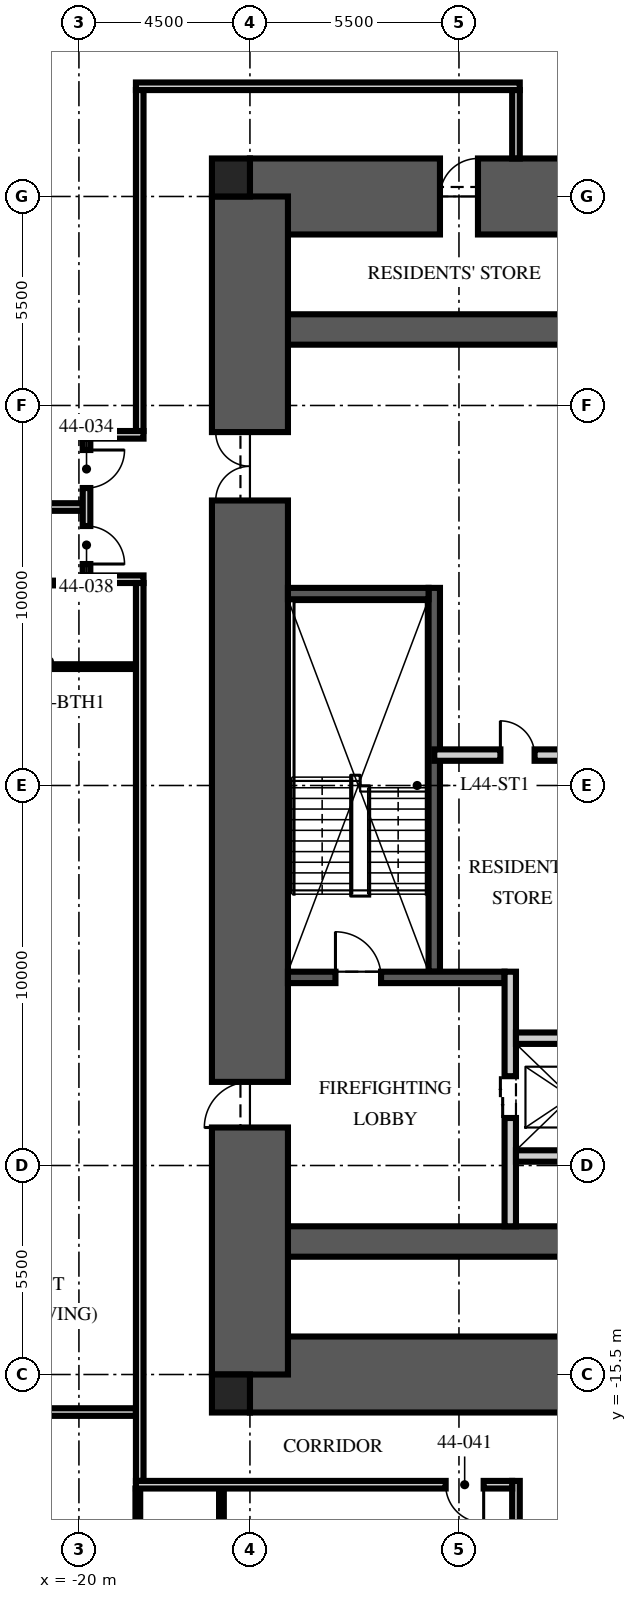
"""IFC4 building model, lengths in metres.
Left out: names, types, materials, properties, quantities, classifications, styles, units other than length and angle.
Written with IfcOpenShell. Run it as: python <this file> out.ifc"""

import sys

from ifc_helpers import new_model, si_unit, direction, frame, frame_2d, origin, origin_2d, place, context, subcontext, project, spatial, rectangle, extrude, element, fill, save


model = new_model("IFC4")
c1 = context("Model", 3, precision=1e-05, world=origin(), true_north=direction((0.0, 1.0)))
c2 = subcontext(c1, "Body", "Model", "MODEL_VIEW")
j1 = project(units=[si_unit("LENGTHUNIT", "METRE"), si_unit("PLANEANGLEUNIT", "RADIAN")], contexts=[c1])
p1 = place(None, origin())
s1 = spatial("IfcSite", under=j1, at=p1, CompositionType="ELEMENT")
p2 = place(p1, origin())
s2 = spatial("IfcBuilding", under=s1, at=p2, CompositionType="ELEMENT")
p3 = place(p2, frame((0.0, 0.0, 174.75)))
s3 = spatial("IfcBuildingStorey", under=s2, at=p3, CompositionType="ELEMENT", Elevation=174.75)
p4 = place(p3, frame((-15.5, 15.5, -0.25), z_axis=(0.0, 0.0, 1.0), x_axis=(1.0, 0.0, 0.0)))
e1 = element("IfcWall", 1, at=p4, inside=s3, PredefinedType="SHEAR", context=c2, shape_type="SweptSolid", body=[
    extrude(rectangle(XDim=31.0, YDim=2.0, at=frame_2d((15.5, 0.0))), origin(), (0.0, 0.0, 1.0), 3.75),
])
p5 = place(p4, frame((5.0, 0.0, 0.25)))
e2 = element("IfcOpeningElement", 2, at=p5, cuts=e1, PredefinedType="OPENING", context=c2, shape_type="SweptSolid", body=[
    extrude(rectangle(XDim=1.0, YDim=2.1, at=frame_2d((0.5, 1.05))), frame((0.0, 1.01, 0.0), z_axis=(0.0, -1.0, 0.0), x_axis=(1.0, 0.0, 0.0)), (0.0, 0.0, 1.0), 2.02),
])
p6 = place(p3, frame((-15.5, -15.5, -0.25), z_axis=(0.0, 0.0, 1.0), x_axis=(1.0, 0.0, 0.0)))
e3 = element("IfcWall", 3, at=p6, inside=s3, PredefinedType="SHEAR", context=c2, shape_type="SweptSolid", body=[
    extrude(rectangle(XDim=31.0, YDim=2.0, at=frame_2d((15.5, 0.0))), origin(), (0.0, 0.0, 1.0), 3.75),
])
p7 = place(p6, frame((10.4, 0.0, 0.25)))
e4 = element("IfcOpeningElement", 4, at=p7, cuts=e3, PredefinedType="OPENING", context=c2, shape_type="SweptSolid", body=[
    extrude(rectangle(XDim=1.1, YDim=2.1, at=frame_2d((0.55, 1.05))), frame((0.0, 1.01, 0.0), z_axis=(0.0, -1.0, 0.0), x_axis=(1.0, 0.0, 0.0)), (0.0, 0.0, 1.0), 2.02),
])
p8 = place(p6, frame((13.5, 0.0, 0.25)))
e5 = element("IfcOpeningElement", 5, at=p8, cuts=e3, PredefinedType="OPENING", context=c2, shape_type="SweptSolid", body=[
    extrude(rectangle(XDim=1.1, YDim=2.1, at=frame_2d((0.55, 1.05))), frame((0.0, 1.01, 0.0), z_axis=(0.0, -1.0, 0.0), x_axis=(1.0, 0.0, 0.0)), (0.0, 0.0, 1.0), 2.02),
])
p9 = place(p6, frame((16.6, 0.0, 0.25)))
e6 = element("IfcOpeningElement", 6, at=p9, cuts=e3, PredefinedType="OPENING", context=c2, shape_type="SweptSolid", body=[
    extrude(rectangle(XDim=1.1, YDim=2.1, at=frame_2d((0.55, 1.05))), frame((0.0, 1.01, 0.0), z_axis=(0.0, -1.0, 0.0), x_axis=(1.0, 0.0, 0.0)), (0.0, 0.0, 1.0), 2.02),
])
for number, where, z_axis, x_axis in (
    (7, (-15.5, 12.0, -0.25), (0.0, 0.0, 1.0), (1.0, 0.0, 0.0)),
    (8, (-15.5, -12.0, -0.25), (0.0, 0.0, 1.0), (1.0, 0.0, 0.0)),
):
    element("IfcWall", number, at=place(p3, frame(where, z_axis=z_axis, x_axis=x_axis)), inside=s3, PredefinedType="SHEAR", context=c2, shape_type="SweptSolid", body=[
        extrude(rectangle(XDim=31.0, YDim=0.8, at=frame_2d((15.5, 0.0))), origin(), (0.0, 0.0, 1.0), 3.75),
    ])
p10 = place(p3, frame((-15.5, -15.5, -0.25), z_axis=(0.0, 0.0, 1.0), x_axis=(0.0, 1.0, 0.0)))
e9 = element("IfcWall", 9, at=p10, inside=s3, PredefinedType="SHEAR", context=c2, shape_type="SweptSolid", body=[
    extrude(rectangle(XDim=31.0, YDim=2.0, at=frame_2d((15.5, 0.0))), origin(), (0.0, 0.0, 1.0), 3.75),
])
p11 = place(p10, frame((6.5, 0.0, 0.25)))
e10 = element("IfcOpeningElement", 10, at=p11, cuts=e9, PredefinedType="OPENING", context=c2, shape_type="SweptSolid", body=[
    extrude(rectangle(XDim=1.2, YDim=2.1, at=frame_2d((0.6, 1.05))), frame((0.0, 1.01, 0.0), z_axis=(0.0, -1.0, 0.0), x_axis=(1.0, 0.0, 0.0)), (0.0, 0.0, 1.0), 2.02),
])
p12 = place(p10, frame((23.0, 0.0, 0.25)))
e11 = element("IfcOpeningElement", 11, at=p12, cuts=e9, PredefinedType="OPENING", context=c2, shape_type="SweptSolid", body=[
    extrude(rectangle(XDim=1.8, YDim=2.1, at=frame_2d((0.9, 1.05))), frame((0.0, 1.01, 0.0), z_axis=(0.0, -1.0, 0.0), x_axis=(1.0, 0.0, 0.0)), (0.0, 0.0, 1.0), 2.02),
])
for number, where, z_axis, x_axis in (
    (12, (-16.0, 16.0, -0.25), (0.0, 0.0, 1.0), (1.0, 0.0, 0.0)),
    (13, (-16.0, -16.0, -0.25), (0.0, 0.0, 1.0), (1.0, 0.0, 0.0)),
):
    element("IfcColumn", number, at=place(p3, frame(where, z_axis=z_axis, x_axis=x_axis)), inside=s3, PredefinedType="COLUMN", context=c2, shape_type="SweptSolid", body=[
        extrude(rectangle(XDim=1.0, YDim=1.0, at=origin_2d()), origin(), (0.0, 0.0, 1.0), 3.75),
    ])
p13 = place(p3, frame((-10.65, -4.9, 0.0), z_axis=(0.0, 0.0, 1.0), x_axis=(0.0, 1.0, 0.0)))
e14 = element("IfcWall", 14, at=p13, inside=s3, PredefinedType="SOLIDWALL", context=c2, shape_type="SweptSolid", body=[
    extrude(rectangle(XDim=10.1, YDim=0.3, at=frame_2d((5.05, 0.0))), origin(), (0.0, 0.0, 1.0), 3.5),
])
p14 = place(p3, frame((-14.5, -5.05, 0.0), z_axis=(0.0, 0.0, 1.0), x_axis=(1.0, 0.0, 0.0)))
e15 = element("IfcWall", 15, at=p14, inside=s3, PredefinedType="SOLIDWALL", context=c2, shape_type="SweptSolid", body=[
    extrude(rectangle(XDim=5.7, YDim=0.3, at=frame_2d((2.85, 0.0))), origin(), (0.0, 0.0, 1.0), 3.5),
])
p15 = place(p14, frame((1.25, 0.0, 0.0)))
e16 = element("IfcOpeningElement", 16, at=p15, cuts=e15, PredefinedType="OPENING", context=c2, shape_type="SweptSolid", body=[
    extrude(rectangle(XDim=1.2, YDim=2.1, at=frame_2d((0.6, 1.05))), frame((0.0, 0.16, 0.0), z_axis=(0.0, -1.0, 0.0), x_axis=(1.0, 0.0, 0.0)), (0.0, 0.0, 1.0), 0.32),
])
p16 = place(p3, frame((-14.5, 5.05, 0.0), z_axis=(0.0, 0.0, 1.0), x_axis=(1.0, 0.0, 0.0)))
e17 = element("IfcWall", 17, at=p16, inside=s3, PredefinedType="SOLIDWALL", context=c2, shape_type="SweptSolid", body=[
    extrude(rectangle(XDim=3.7, YDim=0.3, at=frame_2d((1.85, 0.0))), origin(), (0.0, 0.0, 1.0), 3.5),
])
p17 = place(p3, frame((-8.65, -11.6, 0.0), z_axis=(0.0, 0.0, 1.0), x_axis=(0.0, 1.0, 0.0)))
e18 = element("IfcWall", 18, at=p17, inside=s3, PredefinedType="PARTITIONING", context=c2, shape_type="SweptSolid", body=[
    extrude(rectangle(XDim=6.7, YDim=0.3, at=frame_2d((3.35, 0.0))), origin(), (0.0, 0.0, 1.0), 3.5),
])
p18 = place(p17, frame((2.85, 0.0, 0.0)))
e19 = element("IfcOpeningElement", 19, at=p18, cuts=e18, PredefinedType="OPENING", context=c2, shape_type="SweptSolid", body=[
    extrude(rectangle(XDim=1.1, YDim=2.1, at=frame_2d((0.55, 1.05))), frame((0.0, 0.16, 0.0), z_axis=(0.0, -1.0, 0.0), x_axis=(1.0, 0.0, 0.0)), (0.0, 0.0, 1.0), 0.32),
])
p19 = place(p3, frame((-8.5, -6.65, 0.0), z_axis=(0.0, 0.0, 1.0), x_axis=(1.0, 0.0, 0.0)))
e20 = element("IfcWall", 20, at=p19, inside=s3, PredefinedType="PARTITIONING", context=c2, shape_type="SweptSolid", body=[
    extrude(rectangle(XDim=17.0, YDim=0.3, at=frame_2d((8.5, 0.0))), origin(), (0.0, 0.0, 1.0), 3.5),
])
p20 = place(p19, frame((7.8, 0.0, 0.0)))
e21 = element("IfcOpeningElement", 21, at=p20, cuts=e20, PredefinedType="OPENING", context=c2, shape_type="SweptSolid", body=[
    extrude(rectangle(XDim=1.3, YDim=2.4, at=frame_2d((0.65, 1.2))), frame((0.0, 0.16, 0.0), z_axis=(0.0, -1.0, 0.0), x_axis=(1.0, 0.0, 0.0)), (0.0, 0.0, 1.0), 0.32),
])
p21 = place(p19, frame((5.65, 0.0, 0.0)))
e22 = element("IfcOpeningElement", 22, at=p21, cuts=e20, PredefinedType="OPENING", context=c2, shape_type="SweptSolid", body=[
    extrude(rectangle(XDim=0.9, YDim=2.1, at=frame_2d((0.45, 1.05))), frame((0.0, 0.16, 0.0), z_axis=(0.0, -1.0, 0.0), x_axis=(1.0, 0.0, 0.0)), (0.0, 0.0, 1.0), 0.32),
])
p22 = place(p19, frame((10.4, 0.0, 0.0)))
e23 = element("IfcOpeningElement", 23, at=p22, cuts=e20, PredefinedType="OPENING", context=c2, shape_type="SweptSolid", body=[
    extrude(rectangle(XDim=0.9, YDim=2.1, at=frame_2d((0.45, 1.05))), frame((0.0, 0.16, 0.0), z_axis=(0.0, -1.0, 0.0), x_axis=(1.0, 0.0, 0.0)), (0.0, 0.0, 1.0), 0.32),
])
p23 = place(p3, frame((-8.5, -9.75, 0.0), z_axis=(0.0, 0.0, 1.0), x_axis=(1.0, 0.0, 0.0)))
e24 = element("IfcWall", 24, at=p23, inside=s3, PredefinedType="PARTITIONING", context=c2, shape_type="SweptSolid", body=[
    extrude(rectangle(XDim=2.9, YDim=0.3, at=frame_2d((1.45, 0.0))), origin(), (0.0, 0.0, 1.0), 3.5),
])
p24 = place(p3, frame((-10.65, 0.8, 0.0), z_axis=(0.0, 0.0, 1.0), x_axis=(1.0, 0.0, 0.0)))
e25 = element("IfcWall", 25, at=p24, inside=s3, PredefinedType="PARTITIONING", context=c2, shape_type="SweptSolid", body=[
    extrude(rectangle(XDim=21.3, YDim=0.3, at=frame_2d((10.65, 0.0))), origin(), (0.0, 0.0, 1.0), 3.5),
])
p25 = place(p24, frame((10.05, 0.0, 0.0)))
e26 = element("IfcOpeningElement", 26, at=p25, cuts=e25, PredefinedType="OPENING", context=c2, shape_type="SweptSolid", body=[
    extrude(rectangle(XDim=1.2, YDim=2.1, at=frame_2d((0.6, 1.05))), frame((0.0, 0.16, 0.0), z_axis=(0.0, -1.0, 0.0), x_axis=(1.0, 0.0, 0.0)), (0.0, 0.0, 1.0), 0.32),
])
p26 = place(p24, frame((1.74, 0.0, 0.0)))
e27 = element("IfcOpeningElement", 27, at=p26, cuts=e25, PredefinedType="OPENING", context=c2, shape_type="SweptSolid", body=[
    extrude(rectangle(XDim=0.9, YDim=2.1, at=frame_2d((0.45, 1.05))), frame((0.0, 0.16, 0.0), z_axis=(0.0, -1.0, 0.0), x_axis=(1.0, 0.0, 0.0)), (0.0, 0.0, 1.0), 0.32),
])
p27 = place(p3, frame((-18.5, 18.4, 0.0), z_axis=(0.0, 0.0, 1.0), x_axis=(1.0, 0.0, 0.0)))
e28 = element("IfcWall", 28, at=p27, inside=s3, PredefinedType="PARTITIONING", context=c2, shape_type="SweptSolid", body=[
    extrude(rectangle(XDim=10.1, YDim=0.2, at=frame_2d((5.05, 0.0))), origin(), (0.0, 0.0, 1.0), 2.3),
])
p28 = place(p3, frame((-8.5, 18.3, 0.0), z_axis=(0.0, 0.0, 1.0), x_axis=(0.0, -1.0, 0.0)))
e29 = element("IfcWall", 29, at=p28, inside=s3, PredefinedType="PARTITIONING", context=c2, shape_type="SweptSolid", body=[
    extrude(rectangle(XDim=1.8, YDim=0.2, at=frame_2d((0.9, 0.0))), origin(), (0.0, 0.0, 1.0), 3.5),
])
p29 = place(p3, frame((-19.9, 7.328, 0.0), z_axis=(0.0, 0.0, 1.0), x_axis=(-1.0, 0.0, 0.0)))
e30 = element("IfcWall", 30, at=p29, inside=s3, PredefinedType="PARTITIONING", context=c2, shape_type="SweptSolid", body=[
    extrude(rectangle(XDim=8.25, YDim=0.2, at=frame_2d((4.125, 0.0))), origin(), (0.0, 0.0, 1.0), 2.81),
])
p30 = place(p3, frame((-18.5, -16.488, 0.0), z_axis=(0.0, 0.0, 1.0), x_axis=(-1.0, 0.0, 0.0)))
e31 = element("IfcWall", 31, at=p30, inside=s3, PredefinedType="PARTITIONING", context=c2, shape_type="SweptSolid", body=[
    extrude(rectangle(XDim=9.65, YDim=0.2, at=frame_2d((4.825, 0.0))), origin(), (0.0, 0.0, 1.0), 2.81),
])
p31 = place(p3, frame((-19.97, 5.328, 0.0), z_axis=(0.0, 0.0, 1.0), x_axis=(-1.0, 0.0, 0.0)))
e32 = element("IfcWall", 32, at=p31, inside=s3, PredefinedType="PARTITIONING", context=c2, shape_type="SweptSolid", body=[
    extrude(rectangle(XDim=2.48, YDim=0.125, at=frame_2d((1.24, 0.0))), origin(), (0.0, 0.0, 1.0), 3.5),
])
p32 = place(p3, frame((-18.5, 3.128, 0.0), z_axis=(0.0, 0.0, 1.0), x_axis=(-1.0, 0.0, 0.0)))
e33 = element("IfcWall", 33, at=p32, inside=s3, PredefinedType="PARTITIONING", context=c2, shape_type="SweptSolid", body=[
    extrude(rectangle(XDim=3.95, YDim=0.125, at=frame_2d((1.975, 0.0))), origin(), (0.0, 0.0, 1.0), 3.5),
])
p33 = place(p3, frame((-18.45, -18.5, 0.0), z_axis=(0.0, 0.0, 1.0), x_axis=(0.0, -1.0, 0.0)))
e34 = element("IfcWall", 34, at=p33, inside=s3, PredefinedType="PARTITIONING", context=c2, shape_type="SweptSolid", body=[
    extrude(rectangle(XDim=3.95, YDim=0.125, at=frame_2d((1.975, 0.0))), origin(), (0.0, 0.0, 1.0), 2.3),
])
p34 = place(p3, frame((-16.25, -18.5, 0.0), z_axis=(0.0, 0.0, 1.0), x_axis=(0.0, -1.0, 0.0)))
e35 = element("IfcWall", 35, at=p34, inside=s3, PredefinedType="PARTITIONING", context=c2, shape_type="SweptSolid", body=[
    extrude(rectangle(XDim=3.95, YDim=0.125, at=frame_2d((1.975, 0.0))), origin(), (0.0, 0.0, 1.0), 3.5),
])
p35 = place(p3, frame((-18.4, 18.3, 0.0), z_axis=(0.0, 0.0, 1.0), x_axis=(0.0, -1.0, 0.0)))
e36 = element("IfcWall", 36, at=p35, inside=s3, PredefinedType="PARTITIONING", context=c2, shape_type="SweptSolid", body=[
    extrude(rectangle(XDim=8.972, YDim=0.2, at=frame_2d((4.486, 0.0))), origin(), (0.0, 0.0, 1.0), 2.3),
])
p36 = place(p3, frame((-18.3, 9.228, 0.0), z_axis=(0.0, 0.0, 1.0), x_axis=(-1.0, 0.0, 0.0)))
e37 = element("IfcWall", 37, at=p36, inside=s3, PredefinedType="PARTITIONING", context=c2, shape_type="SweptSolid", body=[
    extrude(rectangle(XDim=1.6, YDim=0.2, at=frame_2d((0.8, 0.0))), origin(), (0.0, 0.0, 1.0), 2.7),
])
p37 = place(p3, frame((-18.3, 5.428, 0.0), z_axis=(0.0, 0.0, 1.0), x_axis=(-1.0, 0.0, 0.0)))
e38 = element("IfcWall", 38, at=p37, inside=s3, PredefinedType="PARTITIONING", context=c2, shape_type="SweptSolid", body=[
    extrude(rectangle(XDim=1.6, YDim=0.2, at=frame_2d((0.8, 0.0))), origin(), (0.0, 0.0, 1.0), 3.5),
])
p38 = place(p3, frame((-19.8, 9.128, 0.0), z_axis=(0.0, 0.0, 1.0), x_axis=(0.0, -1.0, 0.0)))
e39 = element("IfcWall", 39, at=p38, inside=s3, PredefinedType="PARTITIONING", context=c2, shape_type="SweptSolid", body=[
    extrude(rectangle(XDim=3.6, YDim=0.2, at=frame_2d((1.8, 0.0))), origin(), (0.0, 0.0, 1.0), 2.7),
])
p39 = place(p38, frame((0.3, 0.0, 0.0)))
e40 = element("IfcOpeningElement", 40, at=p39, cuts=e39, PredefinedType="OPENING", context=c2, shape_type="SweptSolid", body=[
    extrude(rectangle(XDim=1.0, YDim=2.2, at=frame_2d((0.5, 1.1))), frame((0.0, 0.11, 0.0), z_axis=(0.0, -1.0, 0.0), x_axis=(1.0, 0.0, 0.0)), (0.0, 0.0, 1.0), 0.22),
])
p40 = place(p38, frame((2.3, 0.0, 0.0)))
e41 = element("IfcOpeningElement", 41, at=p40, cuts=e39, PredefinedType="OPENING", context=c2, shape_type="SweptSolid", body=[
    extrude(rectangle(XDim=1.0, YDim=2.2, at=frame_2d((0.5, 1.1))), frame((0.0, 0.11, 0.0), z_axis=(0.0, -1.0, 0.0), x_axis=(1.0, 0.0, 0.0)), (0.0, 0.0, 1.0), 0.22),
])
p41 = place(p3, frame((-18.4, 5.328, 0.0), z_axis=(0.0, 0.0, 1.0), x_axis=(0.0, -1.0, 0.0)))
e42 = element("IfcWall", 42, at=p41, inside=s3, PredefinedType="PARTITIONING", context=c2, shape_type="SweptSolid", body=[
    extrude(rectangle(XDim=23.628, YDim=0.2, at=frame_2d((11.814, 0.0))), origin(), (0.0, 0.0, 1.0), 2.3),
])
p42 = place(p3, frame((-8.5, -18.3, 0.0), z_axis=(0.0, 0.0, 1.0), x_axis=(0.0, -1.0, 0.0)))
e43 = element("IfcWall", 43, at=p42, inside=s3, PredefinedType="PARTITIONING", context=c2, shape_type="SweptSolid", body=[
    extrude(rectangle(XDim=3.0, YDim=0.2, at=frame_2d((1.5, 0.0))), origin(), (0.0, 0.0, 1.0), 3.5),
])
p43 = place(p3, frame((-8.6, -18.4, 0.0), z_axis=(0.0, 0.0, 1.0), x_axis=(-1.0, 0.0, 0.0)))
e44 = element("IfcWall", 44, at=p43, inside=s3, PredefinedType="PARTITIONING", context=c2, shape_type="SweptSolid", body=[
    extrude(rectangle(XDim=9.9, YDim=0.2, at=frame_2d((4.95, 0.0))), origin(), (0.0, 0.0, 1.0), 2.3),
])
p44 = place(p43, frame((0.75, 0.0, 0.0)))
e45 = element("IfcOpeningElement", 45, at=p44, cuts=e44, PredefinedType="OPENING", context=c2, shape_type="SweptSolid", body=[
    extrude(rectangle(XDim=1.0, YDim=2.2, at=frame_2d((0.5, 1.1))), frame((0.0, 0.11, 0.0), z_axis=(0.0, -1.0, 0.0), x_axis=(1.0, 0.0, 0.0)), (0.0, 0.0, 1.0), 0.22),
])
p45 = place(p15, origin())
e46 = element("IfcDoor", 46, at=p45, inside=s3, OperationType="SINGLE_SWING_LEFT", PredefinedType="DOOR", context=c2, shape_type="SweptSolid", body=[
    extrude(rectangle(XDim=1.2, YDim=2.1, at=frame_2d((0.6, 1.05))), frame((0.0, 0.025, 0.0), z_axis=(0.0, -1.0, 0.0), x_axis=(1.0, 0.0, 0.0)), (0.0, 0.0, 1.0), 0.05),
])
fill(e16, e46)
p46 = place(p11, origin())
e47 = element("IfcDoor", 47, at=p46, inside=s3, OperationType="SINGLE_SWING_LEFT", PredefinedType="DOOR", context=c2, shape_type="SweptSolid", body=[
    extrude(rectangle(XDim=1.2, YDim=2.1, at=frame_2d((0.6, 1.05))), frame((0.0, 0.025, 0.0), z_axis=(0.0, -1.0, 0.0), x_axis=(1.0, 0.0, 0.0)), (0.0, 0.0, 1.0), 0.05),
])
fill(e10, e47)
p47 = place(p12, origin())
e48 = element("IfcDoor", 48, at=p47, inside=s3, OperationType="DOUBLE_DOOR_SINGLE_SWING", PredefinedType="DOOR", context=c2, shape_type="SweptSolid", body=[
    extrude(rectangle(XDim=1.8, YDim=2.1, at=frame_2d((0.9, 1.05))), frame((0.0, 0.025, 0.0), z_axis=(0.0, -1.0, 0.0), x_axis=(1.0, 0.0, 0.0)), (0.0, 0.0, 1.0), 0.05),
])
fill(e11, e48)
p48 = place(p18, origin())
e49 = element("IfcDoor", 49, at=p48, inside=s3, OperationType="DOUBLE_DOOR_SLIDING", PredefinedType="DOOR", context=c2, shape_type="SweptSolid", body=[
    extrude(rectangle(XDim=1.1, YDim=2.1, at=frame_2d((0.55, 1.05))), frame((0.0, 0.025, 0.0), z_axis=(0.0, -1.0, 0.0), x_axis=(1.0, 0.0, 0.0)), (0.0, 0.0, 1.0), 0.05),
])
fill(e19, e49)
p49 = place(p26, origin())
e50 = element("IfcDoor", 50, at=p49, inside=s3, OperationType="SINGLE_SWING_LEFT", PredefinedType="DOOR", context=c2, shape_type="SweptSolid", body=[
    extrude(rectangle(XDim=0.9, YDim=2.1, at=frame_2d((0.45, 1.05))), frame((0.0, 0.025, 0.0), z_axis=(0.0, -1.0, 0.0), x_axis=(1.0, 0.0, 0.0)), (0.0, 0.0, 1.0), 0.05),
])
fill(e27, e50)
p50 = place(p5, origin())
e51 = element("IfcDoor", 51, at=p50, inside=s3, OperationType="SINGLE_SWING_RIGHT", PredefinedType="DOOR", context=c2, shape_type="SweptSolid", body=[
    extrude(rectangle(XDim=1.0, YDim=2.1, at=frame_2d((0.5, 1.05))), frame((0.0, 0.025, 0.0), z_axis=(0.0, -1.0, 0.0), x_axis=(1.0, 0.0, 0.0)), (0.0, 0.0, 1.0), 0.05),
])
fill(e2, e51)
p51 = place(p39, origin())
e52 = element("IfcDoor", 52, at=p51, inside=s3, OperationType="SINGLE_SWING_LEFT", PredefinedType="DOOR", context=c2, shape_type="SweptSolid", body=[
    extrude(rectangle(XDim=1.0, YDim=2.2, at=frame_2d((0.5, 1.1))), frame((0.0, 0.025, 0.0), z_axis=(0.0, -1.0, 0.0), x_axis=(1.0, 0.0, 0.0)), (0.0, 0.0, 1.0), 0.05),
])
fill(e40, e52)
p52 = place(p40, origin())
e53 = element("IfcDoor", 53, at=p52, inside=s3, OperationType="SINGLE_SWING_RIGHT", PredefinedType="DOOR", context=c2, shape_type="SweptSolid", body=[
    extrude(rectangle(XDim=1.0, YDim=2.2, at=frame_2d((0.5, 1.1))), frame((0.0, 0.025, 0.0), z_axis=(0.0, -1.0, 0.0), x_axis=(1.0, 0.0, 0.0)), (0.0, 0.0, 1.0), 0.05),
])
fill(e41, e53)
p53 = place(p44, origin())
e54 = element("IfcDoor", 54, at=p53, inside=s3, OperationType="SINGLE_SWING_LEFT", PredefinedType="DOOR", context=c2, shape_type="SweptSolid", body=[
    extrude(rectangle(XDim=1.0, YDim=2.2, at=frame_2d((0.5, 1.1))), frame((0.0, 0.025, 0.0), z_axis=(0.0, -1.0, 0.0), x_axis=(1.0, 0.0, 0.0)), (0.0, 0.0, 1.0), 0.05),
])
fill(e45, e54)
save(model, sys.argv[1])
